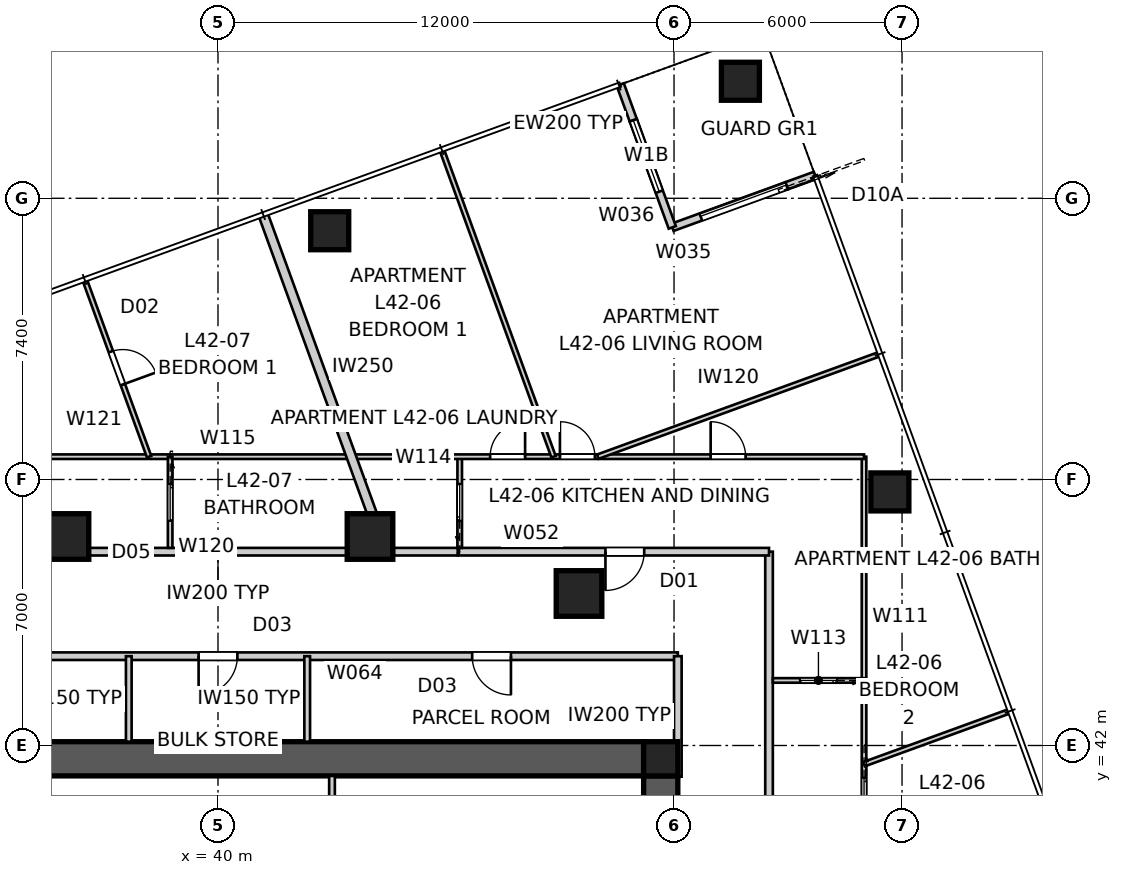
"""IFC4 building model, lengths in metres.
Left out: names, types, materials, properties, quantities, classifications, styles, units other than length and angle.
Written with IfcOpenShell. Run it as: python <this file> out.ifc"""

import sys

from ifc_helpers import new_model, si_unit, direction, frame, frame_2d, origin, origin_2d, place, context, subcontext, project, spatial, polyline, rectangle, outline, extrude, element, fill, save


model = new_model("IFC4")
c1 = context("Model", 3, precision=1e-05, world=origin(), true_north=direction((0.0, 1.0)))
c2 = subcontext(c1, "Body", "Model", "MODEL_VIEW")
j1 = project(units=[si_unit("LENGTHUNIT", "METRE"), si_unit("PLANEANGLEUNIT", "RADIAN")], contexts=[c1])
p1 = place(None, origin())
s1 = spatial("IfcSite", under=j1, at=p1, CompositionType="ELEMENT")
p2 = place(p1, origin())
s2 = spatial("IfcBuilding", under=s1, at=p2, CompositionType="ELEMENT")
p3 = place(p2, frame((0.0, 0.0, 154.0)))
s3 = spatial("IfcBuildingStorey", under=s2, at=p3, CompositionType="ELEMENT", Elevation=154.0)
p4 = place(p3, frame((28.8, 41.65, 0.0), z_axis=(0.0, 0.0, 1.0), x_axis=(1.0, 0.0, 0.0)))
e1 = element("IfcWall", 1, at=p4, inside=s3, PredefinedType="SHEAR", context=c2, shape_type="SweptSolid", body=[
    extrude(outline(polyline([(0.0, -0.45), (22.4, -0.45), (22.4, -0.025), (22.85, -0.025), (22.85, 0.025), (22.4, 0.025), (22.4, 0.45), (0.0, 0.45), (0.0, 0.025), (-0.45, 0.025), (-0.45, -0.025), (0.0, -0.025), (0.0, -0.45)])), origin(), (0.0, 0.0, 1.0), 3.4),
])
p5 = place(p3, frame((51.65, 18.8, 0.0), z_axis=(0.0, 0.0, 1.0), x_axis=(0.0, 1.0, 0.0)))
e2 = element("IfcWall", 2, at=p5, inside=s3, PredefinedType="SHEAR", context=c2, shape_type="SweptSolid", body=[
    extrude(outline(polyline([(0.0, -0.45), (22.4, -0.45), (22.4, -0.025), (22.85, -0.025), (22.85, 0.025), (22.4, 0.025), (22.4, 0.45), (0.0, 0.45), (0.0, 0.025), (-0.45, 0.025), (-0.45, -0.025), (0.0, -0.025), (0.0, -0.45)])), origin(), (0.0, 0.0, 1.0), 3.4),
])
p6 = place(p5, frame((11.14, 0.0, 0.0)))
e3 = element("IfcOpeningElement", 3, at=p6, cuts=e2, PredefinedType="OPENING", context=c2, shape_type="SweptSolid", body=[
    extrude(rectangle(XDim=1.02, YDim=2.4, at=frame_2d((0.51, 1.2))), frame((0.0, 0.46, 0.0), z_axis=(0.0, -1.0, 0.0), x_axis=(1.0, 0.0, 0.0)), (0.0, 0.0, 1.0), 0.92),
])
p7 = place(p3, frame((51.65, 41.65, 0.0), z_axis=(0.0, 0.0, 1.0), x_axis=(1.0, 0.0, 0.0)))
e4 = element("IfcColumn", 4, at=p7, inside=s3, PredefinedType="COLUMN", context=c2, shape_type="SweptSolid", body=[
    extrude(rectangle(XDim=0.9, YDim=0.9, at=origin_2d()), origin(), (0.0, 0.0, 1.0), 3.4),
])
for number, where, z_axis, x_axis in (
    (5, (57.68, 48.673, 0.0), (0.0, 0.0, 1.0), (1.0, 0.0, 0.0)),
    (6, (53.747, 59.479, 0.0), (0.0, 0.0, 1.0), (1.0, 0.0, 0.0)),
    (7, (42.94, 55.546, 0.0), (0.0, 0.0, 1.0), (1.0, 0.0, 0.0)),
):
    element("IfcColumn", number, at=place(p3, frame(where, z_axis=z_axis, x_axis=x_axis)), inside=s3, PredefinedType="COLUMN", context=c2, shape_type="SweptSolid", body=[
        extrude(rectangle(XDim=1.0, YDim=1.0, at=origin_2d()), origin(), (0.0, 0.0, 1.0), 3.4),
    ])
for number, where, z_axis, x_axis in (
    (8, (49.5, 46.0, 0.0), (0.0, 0.0, 1.0), (1.0, 0.0, 0.0)),
    (9, (44.0, 47.5, 0.0), (0.0, 0.0, 1.0), (1.0, 0.0, 0.0)),
    (10, (36.0, 47.5, 0.0), (0.0, 0.0, 1.0), (1.0, 0.0, 0.0)),
):
    element("IfcColumn", number, at=place(p3, frame(where, z_axis=z_axis, x_axis=x_axis)), inside=s3, PredefinedType="COLUMN", context=c2, shape_type="SweptSolid", body=[
        extrude(rectangle(XDim=1.2, YDim=1.2, at=origin_2d()), origin(), (0.0, 0.0, 1.0), 3.4),
    ])
p8 = place(p3, frame((55.712, 57.002, 0.0), z_axis=(0.0, 0.0, 1.0), x_axis=(-0.939659694648, -0.342110593602, 0.0)))
e11 = element("IfcWall", 11, at=p8, inside=s3, PredefinedType="SOLIDWALL", context=c2, shape_type="SweptSolid", body=[
    extrude(rectangle(XDim=0.8, YDim=0.2, at=frame_2d((0.4, 0.0))), origin(), (0.0, 0.0, 1.0), 3.25),
])
p9 = place(p3, frame((54.96, 56.729, 0.0), z_axis=(0.0, 0.0, 1.0), x_axis=(-0.939693144909, -0.342018703306, 0.0)))
e12 = element("IfcWall", 12, at=p9, inside=s3, PredefinedType="SOLIDWALL", context=c2, shape_type="SweptSolid", body=[
    extrude(rectangle(XDim=3.2, YDim=0.2, at=frame_2d((1.6, 0.0))), origin(), (0.0, 0.0, 1.0), 2.721),
])
p10 = place(p9, origin())
e13 = element("IfcOpeningElement", 13, at=p10, cuts=e12, PredefinedType="OPENING", context=c2, shape_type="SweptSolid", body=[
    extrude(rectangle(XDim=2.4, YDim=2.1, at=frame_2d((1.2, 1.05))), frame((0.0, 0.11, 0.0), z_axis=(0.0, -1.0, 0.0), x_axis=(1.0, 0.0, 0.0)), (0.0, 0.0, 1.0), 0.22),
])
p11 = place(p3, frame((51.953, 55.634, 0.0), z_axis=(0.0, 0.0, 1.0), x_axis=(-0.341965219194, 0.939712609717, 0.0)))
e14 = element("IfcWall", 14, at=p11, inside=s3, PredefinedType="SOLIDWALL", context=c2, shape_type="SweptSolid", body=[
    extrude(rectangle(XDim=3.0, YDim=0.2, at=frame_2d((1.5, 0.0))), origin(), (0.0, 0.0, 1.0), 2.721),
])
p12 = place(p11, frame((1.0, 0.0, 0.45)))
e15 = element("IfcOpeningElement", 15, at=p12, cuts=e14, PredefinedType="OPENING", context=c2, shape_type="SweptSolid", body=[
    extrude(rectangle(XDim=2.0, YDim=1.8, at=frame_2d((1.0, 0.9))), frame((0.0, 0.11, 0.0), z_axis=(0.0, -1.0, 0.0), x_axis=(1.0, 0.0, 0.0)), (0.0, 0.0, 1.0), 0.22),
])
p13 = place(p3, frame((50.927, 58.453, 0.0), z_axis=(0.0, 0.0, 1.0), x_axis=(-0.342037080957, 0.939686455819, 0.0)))
e16 = element("IfcWall", 16, at=p13, inside=s3, PredefinedType="SOLIDWALL", context=c2, shape_type="SweptSolid", body=[
    extrude(rectangle(XDim=1.0, YDim=0.2, at=frame_2d((0.5, 0.0))), origin(), (0.0, 0.0, 1.0), 3.25),
])
p14 = place(p3, frame((54.5, 13.7, 0.0), z_axis=(0.0, 0.0, 1.0), x_axis=(0.0, 1.0, 0.0)))
e17 = element("IfcWall", 17, at=p14, inside=s3, PredefinedType="PARTITIONING", context=c2, shape_type="SweptSolid", body=[
    extrude(rectangle(XDim=33.4, YDim=0.2, at=frame_2d((16.7, 0.0))), origin(), (0.0, 0.0, 1.0), 3.25),
])
p15 = place(p14, frame((5.028, 0.0, 0.0)))
e18 = element("IfcOpeningElement", 18, at=p15, cuts=e17, PredefinedType="OPENING", context=c2, shape_type="SweptSolid", body=[
    extrude(rectangle(XDim=1.02, YDim=2.1, at=frame_2d((0.51, 1.05))), frame((0.0, 0.11, 0.0), z_axis=(0.0, -1.0, 0.0), x_axis=(1.0, 0.0, 0.0)), (0.0, 0.0, 1.0), 0.22),
])
p16 = place(p14, frame((13.587, 0.0, 0.0)))
e19 = element("IfcOpeningElement", 19, at=p16, cuts=e17, PredefinedType="OPENING", context=c2, shape_type="SweptSolid", body=[
    extrude(rectangle(XDim=1.02, YDim=2.34, at=frame_2d((0.51, 1.17))), frame((0.0, 0.11, 0.0), z_axis=(0.0, -1.0, 0.0), x_axis=(1.0, 0.0, 0.0)), (0.0, 0.0, 1.0), 0.22),
])
p17 = place(p3, frame((54.5, 47.1, 0.0), z_axis=(0.0, 0.0, 1.0), x_axis=(-1.0, 0.0, 0.0)))
e20 = element("IfcWall", 20, at=p17, inside=s3, PredefinedType="PARTITIONING", context=c2, shape_type="SweptSolid", body=[
    extrude(rectangle(XDim=8.192, YDim=0.2, at=frame_2d((4.096, 0.0))), origin(), (0.0, 0.0, 1.0), 3.25),
])
p18 = place(p17, frame((3.285, 0.0, 0.0)))
e21 = element("IfcOpeningElement", 21, at=p18, cuts=e20, PredefinedType="OPENING", context=c2, shape_type="SweptSolid", body=[
    extrude(rectangle(XDim=1.02, YDim=2.34, at=frame_2d((0.51, 1.17))), frame((0.0, 0.11, 0.0), z_axis=(0.0, -1.0, 0.0), x_axis=(1.0, 0.0, 0.0)), (0.0, 0.0, 1.0), 0.22),
])
p19 = place(p3, frame((46.308, 47.1, 0.0), z_axis=(0.0, 0.0, 1.0), x_axis=(-1.0, 0.0, 0.0)))
e22 = element("IfcWall", 22, at=p19, inside=s3, PredefinedType="PARTITIONING", context=c2, shape_type="SweptSolid", body=[
    extrude(rectangle(XDim=1.683, YDim=0.2, at=frame_2d((0.842, 0.0))), origin(), (0.0, 0.0, 1.0), 2.55),
])
p20 = place(p3, frame((44.625, 47.1, 0.0), z_axis=(0.0, 0.0, 1.0), x_axis=(-1.0, 0.0, 0.0)))
e23 = element("IfcWall", 23, at=p20, inside=s3, PredefinedType="PARTITIONING", context=c2, shape_type="SweptSolid", body=[
    extrude(rectangle(XDim=9.25, YDim=0.2, at=frame_2d((4.625, 0.0))), origin(), (0.0, 0.0, 1.0), 3.25),
])
p21 = place(p3, frame((41.188, 55.973, 0.0), z_axis=(0.0, 0.0, 1.0), x_axis=(0.342014066156, -0.939694832673, 0.0)))
e24 = element("IfcWall", 24, at=p21, inside=s3, PredefinedType="PARTITIONING", context=c2, shape_type="SweptSolid", body=[
    extrude(rectangle(XDim=9.331, YDim=0.25, at=frame_2d((4.665, 0.0))), origin(), (0.0, 0.0, 1.0), 3.25),
])
p22 = place(p3, frame((43.0, 41.2, 0.0), z_axis=(0.0, 0.0, 1.0), x_axis=(0.0, -1.0, 0.0)))
e25 = element("IfcWall", 25, at=p22, inside=s3, PredefinedType="SOLIDWALL", context=c2, shape_type="SweptSolid", body=[
    extrude(rectangle(XDim=5.9, YDim=0.15, at=frame_2d((2.95, 0.0))), origin(), (0.0, 0.0, 1.0), 3.25),
])
p23 = place(p3, frame((52.1, 44.35, 0.0), z_axis=(0.0, 0.0, 1.0), x_axis=(-1.0, 0.0, 0.0)))
e26 = element("IfcWall", 26, at=p23, inside=s3, PredefinedType="PARTITIONING", context=c2, shape_type="SweptSolid", body=[
    extrude(rectangle(XDim=24.2, YDim=0.2, at=frame_2d((12.1, 0.0))), origin(), (0.0, 0.0, 1.0), 3.25),
])
p24 = place(p23, frame((18.789, 0.0, 0.0)))
e27 = element("IfcOpeningElement", 27, at=p24, cuts=e26, PredefinedType="OPENING", context=c2, shape_type="SweptSolid", body=[
    extrude(rectangle(XDim=1.02, YDim=2.1, at=frame_2d((0.51, 1.05))), frame((0.0, 0.11, 0.0), z_axis=(0.0, -1.0, 0.0), x_axis=(1.0, 0.0, 0.0)), (0.0, 0.0, 1.0), 0.22),
])
p25 = place(p23, frame((4.391, 0.0, 0.0)))
e28 = element("IfcOpeningElement", 28, at=p25, cuts=e26, PredefinedType="OPENING", context=c2, shape_type="SweptSolid", body=[
    extrude(rectangle(XDim=1.02, YDim=2.1, at=frame_2d((0.51, 1.05))), frame((0.0, 0.11, 0.0), z_axis=(0.0, -1.0, 0.0), x_axis=(1.0, 0.0, 0.0)), (0.0, 0.0, 1.0), 0.22),
])
p26 = place(p23, frame((11.59, 0.0, 0.0)))
e29 = element("IfcOpeningElement", 29, at=p26, cuts=e26, PredefinedType="OPENING", context=c2, shape_type="SweptSolid", body=[
    extrude(rectangle(XDim=1.02, YDim=2.1, at=frame_2d((0.51, 1.05))), frame((0.0, 0.11, 0.0), z_axis=(0.0, -1.0, 0.0), x_axis=(1.0, 0.0, 0.0)), (0.0, 0.0, 1.0), 0.22),
])
p27 = place(p3, frame((52.1, 41.18, 0.0), z_axis=(0.0, 0.0, 1.0), x_axis=(0.0, 1.0, 0.0)))
e30 = element("IfcWall", 30, at=p27, inside=s3, PredefinedType="PARTITIONING", context=c2, shape_type="SweptSolid", body=[
    extrude(rectangle(XDim=3.17, YDim=0.2, at=frame_2d((1.585, 0.0))), origin(), (0.0, 0.0, 1.0), 3.25),
])
for number, where, z_axis, x_axis in (
    (31, (37.653, 42.1, 0.0), (0.0, 0.0, 1.0), (0.0, 1.0, 0.0)),
    (32, (42.347, 42.1, 0.0), (0.0, 0.0, 1.0), (0.0, 1.0, 0.0)),
):
    element("IfcWall", number, at=place(p3, frame(where, z_axis=z_axis, x_axis=x_axis)), inside=s3, PredefinedType="SOLIDWALL", context=c2, shape_type="SweptSolid", body=[
        extrude(rectangle(XDim=2.25, YDim=0.15, at=frame_2d((1.125, 0.0))), origin(), (0.0, 0.0, 1.0), 3.25),
    ])
p28 = place(p3, frame((57.0, 49.6, 0.0), z_axis=(0.0, 0.0, 1.0), x_axis=(0.0, -1.0, 0.0)))
e33 = element("IfcWall", 33, at=p28, inside=s3, PredefinedType="PARTITIONING", context=c2, shape_type="SweptSolid", body=[
    extrude(rectangle(XDim=18.589, YDim=0.12, at=frame_2d((9.294, 0.0))), origin(), (0.0, 0.0, 1.0), 2.55),
])
p29 = place(p28, frame((8.452, 0.0, 0.0)))
e34 = element("IfcOpeningElement", 34, at=p29, cuts=e33, PredefinedType="OPENING", context=c2, shape_type="SweptSolid", body=[
    extrude(rectangle(XDim=0.96, YDim=2.1, at=frame_2d((0.48, 1.05))), frame((0.0, 0.07, 0.0), z_axis=(0.0, -1.0, 0.0), x_axis=(1.0, 0.0, 0.0)), (0.0, 0.0, 1.0), 0.14),
])
p30 = place(p28, frame((11.889, 0.0, 0.0)))
e35 = element("IfcOpeningElement", 35, at=p30, cuts=e33, PredefinedType="OPENING", context=c2, shape_type="SweptSolid", body=[
    extrude(rectangle(XDim=0.96, YDim=2.1, at=frame_2d((0.48, 1.05))), frame((0.0, 0.07, 0.0), z_axis=(0.0, -1.0, 0.0), x_axis=(1.0, 0.0, 0.0)), (0.0, 0.0, 1.0), 0.14),
])
p31 = place(p3, frame((57.0, 43.712, 0.0), z_axis=(0.0, 0.0, 1.0), x_axis=(-1.0, 0.0, 0.0)))
e36 = element("IfcWall", 36, at=p31, inside=s3, PredefinedType="PARTITIONING", context=c2, shape_type="SweptSolid", body=[
    extrude(rectangle(XDim=2.4, YDim=0.12, at=frame_2d((1.2, 0.0))), origin(), (0.0, 0.0, 1.0), 3.25),
])
p32 = place(p31, frame((0.72, 0.0, 0.0)))
e37 = element("IfcOpeningElement", 37, at=p32, cuts=e36, PredefinedType="OPENING", context=c2, shape_type="SweptSolid", body=[
    extrude(rectangle(XDim=0.96, YDim=2.1, at=frame_2d((0.48, 1.05))), frame((0.0, 0.07, 0.0), z_axis=(0.0, -1.0, 0.0), x_axis=(1.0, 0.0, 0.0)), (0.0, 0.0, 1.0), 0.14),
])
p33 = place(p3, frame((46.361, 47.2, 0.0), z_axis=(0.0, 0.0, 1.0), x_axis=(0.0, 1.0, 0.0)))
e38 = element("IfcWall", 38, at=p33, inside=s3, PredefinedType="PARTITIONING", context=c2, shape_type="SweptSolid", body=[
    extrude(rectangle(XDim=2.4, YDim=0.12, at=frame_2d((1.2, 0.0))), origin(), (0.0, 0.0, 1.0), 3.25),
])
p34 = place(p33, frame((0.72, 0.0, 0.0)))
e39 = element("IfcOpeningElement", 39, at=p34, cuts=e38, PredefinedType="OPENING", context=c2, shape_type="SweptSolid", body=[
    extrude(rectangle(XDim=0.96, YDim=2.1, at=frame_2d((0.48, 1.05))), frame((0.0, 0.07, 0.0), z_axis=(0.0, -1.0, 0.0), x_axis=(1.0, 0.0, 0.0)), (0.0, 0.0, 1.0), 0.14),
])
p35 = place(p3, frame((27.545, 49.6, 0.0), z_axis=(0.0, 0.0, 1.0), x_axis=(1.0, 0.0, 0.0)))
e40 = element("IfcWall", 40, at=p35, inside=s3, PredefinedType="PARTITIONING", context=c2, shape_type="SweptSolid", body=[
    extrude(rectangle(XDim=29.455, YDim=0.12, at=frame_2d((14.727, 0.0))), origin(), (0.0, 0.0, 1.0), 3.25),
])
p36 = place(p35, frame((4.887, 0.0, 0.0)))
e41 = element("IfcOpeningElement", 41, at=p36, cuts=e40, PredefinedType="OPENING", context=c2, shape_type="SweptSolid", body=[
    extrude(rectangle(XDim=0.92, YDim=2.34, at=frame_2d((0.46, 1.17))), frame((0.0, 0.07, 0.0), z_axis=(0.0, -1.0, 0.0), x_axis=(1.0, 0.0, 0.0)), (0.0, 0.0, 1.0), 0.14),
])
p37 = place(p35, frame((25.418, 0.0, 0.0)))
e42 = element("IfcOpeningElement", 42, at=p37, cuts=e40, PredefinedType="OPENING", context=c2, shape_type="SweptSolid", body=[
    extrude(rectangle(XDim=0.92, YDim=2.34, at=frame_2d((0.46, 1.17))), frame((0.0, 0.07, 0.0), z_axis=(0.0, -1.0, 0.0), x_axis=(1.0, 0.0, 0.0)), (0.0, 0.0, 1.0), 0.14),
])
p38 = place(p35, frame((19.616, 0.0, 0.0)))
e43 = element("IfcOpeningElement", 43, at=p38, cuts=e40, PredefinedType="OPENING", context=c2, shape_type="SweptSolid", body=[
    extrude(rectangle(XDim=0.92, YDim=2.34, at=frame_2d((0.46, 1.17))), frame((0.0, 0.07, 0.0), z_axis=(0.0, -1.0, 0.0), x_axis=(1.0, 0.0, 0.0)), (0.0, 0.0, 1.0), 0.14),
])
p39 = place(p35, frame((21.452, 0.0, 0.0)))
e44 = element("IfcOpeningElement", 44, at=p39, cuts=e40, PredefinedType="OPENING", context=c2, shape_type="SweptSolid", body=[
    extrude(rectangle(XDim=0.92, YDim=2.34, at=frame_2d((0.46, 1.17))), frame((0.0, 0.07, 0.0), z_axis=(0.0, -1.0, 0.0), x_axis=(1.0, 0.0, 0.0)), (0.0, 0.0, 1.0), 0.14),
])
p40 = place(p3, frame((48.829, 49.6, 0.0), z_axis=(0.0, 0.0, 1.0), x_axis=(-0.34202238111, 0.939691806296, 0.0)))
e45 = element("IfcWall", 45, at=p40, inside=s3, PredefinedType="PARTITIONING", context=c2, shape_type="SweptSolid", body=[
    extrude(rectangle(XDim=8.562, YDim=0.12, at=frame_2d((4.281, 0.0))), origin(), (0.0, 0.0, 1.0), 3.25),
])
p41 = place(p3, frame((57.385, 52.29, 0.0), z_axis=(0.0, 0.0, 1.0), x_axis=(-0.939694604347, -0.342014693486, 0.0)))
e46 = element("IfcWall", 46, at=p41, inside=s3, PredefinedType="PARTITIONING", context=c2, shape_type="SweptSolid", body=[
    extrude(rectangle(XDim=7.866, YDim=0.12, at=frame_2d((3.933, 0.0))), origin(), (0.0, 0.0, 1.0), 3.25),
])
p42 = place(p3, frame((60.805, 42.893, 0.0), z_axis=(0.0, 0.0, 1.0), x_axis=(-0.939682468191, -0.342048036063, 0.0)))
e47 = element("IfcWall", 47, at=p42, inside=s3, PredefinedType="PARTITIONING", context=c2, shape_type="SweptSolid", body=[
    extrude(rectangle(XDim=4.049, YDim=0.12, at=frame_2d((2.024, 0.0))), origin(), (0.0, 0.0, 1.0), 3.25),
])
p43 = place(p3, frame((38.741, 49.6, 0.0), z_axis=(0.0, 0.0, 1.0), x_axis=(0.0, -1.0, 0.0)))
e48 = element("IfcWall", 48, at=p43, inside=s3, PredefinedType="PARTITIONING", context=c2, shape_type="SweptSolid", body=[
    extrude(rectangle(XDim=2.4, YDim=0.12, at=frame_2d((1.2, 0.0))), origin(), (0.0, 0.0, 1.0), 3.25),
])
p44 = place(p43, frame((0.72, 0.0, 0.0)))
e49 = element("IfcOpeningElement", 49, at=p44, cuts=e48, PredefinedType="OPENING", context=c2, shape_type="SweptSolid", body=[
    extrude(rectangle(XDim=0.96, YDim=2.1, at=frame_2d((0.48, 1.05))), frame((0.0, 0.07, 0.0), z_axis=(0.0, -1.0, 0.0), x_axis=(1.0, 0.0, 0.0)), (0.0, 0.0, 1.0), 0.14),
])
p45 = place(p3, frame((36.504, 54.225, 0.0), z_axis=(0.0, 0.0, 1.0), x_axis=(0.342017860496, -0.939693451665, 0.0)))
e50 = element("IfcWall", 50, at=p45, inside=s3, PredefinedType="PARTITIONING", context=c2, shape_type="SweptSolid", body=[
    extrude(rectangle(XDim=4.922, YDim=0.12, at=frame_2d((2.461, 0.0))), origin(), (0.0, 0.0, 1.0), 3.25),
])
p46 = place(p45, frame((1.981, 0.0, 0.0)))
e51 = element("IfcOpeningElement", 51, at=p46, cuts=e50, PredefinedType="OPENING", context=c2, shape_type="SweptSolid", body=[
    extrude(rectangle(XDim=0.92, YDim=2.34, at=frame_2d((0.46, 1.17))), frame((0.0, 0.07, 0.0), z_axis=(0.0, -1.0, 0.0), x_axis=(1.0, 0.0, 0.0)), (0.0, 0.0, 1.0), 0.14),
])
p47 = place(p10, origin())
e52 = element("IfcDoor", 52, at=p47, inside=s3, OperationType="SLIDING_TO_LEFT", PredefinedType="DOOR", context=c2, shape_type="SweptSolid", body=[
    extrude(rectangle(XDim=2.4, YDim=2.1, at=frame_2d((1.2, 1.05))), frame((0.0, 0.025, 0.0), z_axis=(0.0, -1.0, 0.0), x_axis=(1.0, 0.0, 0.0)), (0.0, 0.0, 1.0), 0.05),
])
fill(e13, e52)
p48 = place(p12, origin())
e53 = element("IfcWindow", 53, at=p48, inside=s3, PartitioningType="SINGLE_PANEL", PredefinedType="WINDOW", context=c2, shape_type="SweptSolid", body=[
    extrude(rectangle(XDim=2.0, YDim=1.8, at=frame_2d((1.0, 0.9))), frame((0.0, 0.03, 0.0), z_axis=(0.0, -1.0, 0.0), x_axis=(1.0, 0.0, 0.0)), (0.0, 0.0, 1.0), 0.06),
])
fill(e15, e53)
p49 = place(p25, origin())
e54 = element("IfcDoor", 54, at=p49, inside=s3, OperationType="SINGLE_SWING_LEFT", PredefinedType="DOOR", context=c2, shape_type="SweptSolid", body=[
    extrude(rectangle(XDim=1.02, YDim=2.1, at=frame_2d((0.51, 1.05))), frame((0.0, 0.025, 0.0), z_axis=(0.0, -1.0, 0.0), x_axis=(1.0, 0.0, 0.0)), (0.0, 0.0, 1.0), 0.05),
])
fill(e28, e54)
p50 = place(p18, origin())
e55 = element("IfcDoor", 55, at=p50, inside=s3, OperationType="SINGLE_SWING_RIGHT", PredefinedType="DOOR", context=c2, shape_type="SweptSolid", body=[
    extrude(rectangle(XDim=1.02, YDim=2.34, at=frame_2d((0.51, 1.17))), frame((0.0, 0.025, 0.0), z_axis=(0.0, -1.0, 0.0), x_axis=(1.0, 0.0, 0.0)), (0.0, 0.0, 1.0), 0.05),
])
fill(e21, e55)
p51 = place(p26, origin())
e56 = element("IfcDoor", 56, at=p51, inside=s3, OperationType="SINGLE_SWING_RIGHT", PredefinedType="DOOR", context=c2, shape_type="SweptSolid", body=[
    extrude(rectangle(XDim=1.02, YDim=2.1, at=frame_2d((0.51, 1.05))), frame((0.0, 0.025, 0.0), z_axis=(0.0, -1.0, 0.0), x_axis=(1.0, 0.0, 0.0)), (0.0, 0.0, 1.0), 0.05),
])
fill(e29, e56)
p52 = place(p44, origin())
e57 = element("IfcDoor", 57, at=p52, inside=s3, OperationType="SLIDING_TO_LEFT", PredefinedType="DOOR", context=c2, shape_type="SweptSolid", body=[
    extrude(rectangle(XDim=0.96, YDim=2.1, at=frame_2d((0.48, 1.05))), frame((0.0, 0.025, 0.0), z_axis=(0.0, -1.0, 0.0), x_axis=(1.0, 0.0, 0.0)), (0.0, 0.0, 1.0), 0.05),
])
fill(e49, e57)
p53 = place(p37, origin())
e58 = element("IfcDoor", 58, at=p53, inside=s3, OperationType="SINGLE_SWING_LEFT", PredefinedType="DOOR", context=c2, shape_type="SweptSolid", body=[
    extrude(rectangle(XDim=0.92, YDim=2.34, at=frame_2d((0.46, 1.17))), frame((0.0, 0.025, 0.0), z_axis=(0.0, -1.0, 0.0), x_axis=(1.0, 0.0, 0.0)), (0.0, 0.0, 1.0), 0.05),
])
fill(e42, e58)
p54 = place(p38, origin())
e59 = element("IfcDoor", 59, at=p54, inside=s3, OperationType="SINGLE_SWING_RIGHT", PredefinedType="DOOR", context=c2, shape_type="SweptSolid", body=[
    extrude(rectangle(XDim=0.92, YDim=2.34, at=frame_2d((0.46, 1.17))), frame((0.0, 0.025, 0.0), z_axis=(0.0, -1.0, 0.0), x_axis=(1.0, 0.0, 0.0)), (0.0, 0.0, 1.0), 0.05),
])
fill(e43, e59)
p55 = place(p32, origin())
e60 = element("IfcDoor", 60, at=p55, inside=s3, OperationType="SLIDING_TO_LEFT", PredefinedType="DOOR", context=c2, shape_type="SweptSolid", body=[
    extrude(rectangle(XDim=0.96, YDim=2.1, at=frame_2d((0.48, 1.05))), frame((0.0, 0.025, 0.0), z_axis=(0.0, -1.0, 0.0), x_axis=(1.0, 0.0, 0.0)), (0.0, 0.0, 1.0), 0.05),
])
fill(e37, e60)
p56 = place(p34, origin())
e61 = element("IfcDoor", 61, at=p56, inside=s3, OperationType="SLIDING_TO_LEFT", PredefinedType="DOOR", context=c2, shape_type="SweptSolid", body=[
    extrude(rectangle(XDim=0.96, YDim=2.1, at=frame_2d((0.48, 1.05))), frame((0.0, 0.025, 0.0), z_axis=(0.0, -1.0, 0.0), x_axis=(1.0, 0.0, 0.0)), (0.0, 0.0, 1.0), 0.05),
])
fill(e39, e61)
p57 = place(p39, origin())
e62 = element("IfcDoor", 62, at=p57, inside=s3, OperationType="SINGLE_SWING_LEFT", PredefinedType="DOOR", context=c2, shape_type="SweptSolid", body=[
    extrude(rectangle(XDim=0.92, YDim=2.34, at=frame_2d((0.46, 1.17))), frame((0.0, 0.025, 0.0), z_axis=(0.0, -1.0, 0.0), x_axis=(1.0, 0.0, 0.0)), (0.0, 0.0, 1.0), 0.05),
])
fill(e44, e62)
p58 = place(p46, origin())
e63 = element("IfcDoor", 63, at=p58, inside=s3, OperationType="SINGLE_SWING_RIGHT", PredefinedType="DOOR", context=c2, shape_type="SweptSolid", body=[
    extrude(rectangle(XDim=0.92, YDim=2.34, at=frame_2d((0.46, 1.17))), frame((0.0, 0.025, 0.0), z_axis=(0.0, -1.0, 0.0), x_axis=(1.0, 0.0, 0.0)), (0.0, 0.0, 1.0), 0.05),
])
fill(e51, e63)
p59 = place(p29, origin())
e64 = element("IfcDoor", 64, at=p59, inside=s3, OperationType="SLIDING_TO_LEFT", PredefinedType="DOOR", context=c2, shape_type="SweptSolid", body=[
    extrude(rectangle(XDim=0.96, YDim=2.1, at=frame_2d((0.48, 1.05))), frame((0.0, 0.025, 0.0), z_axis=(0.0, -1.0, 0.0), x_axis=(1.0, 0.0, 0.0)), (0.0, 0.0, 1.0), 0.05),
])
fill(e34, e64)
save(model, sys.argv[1])
